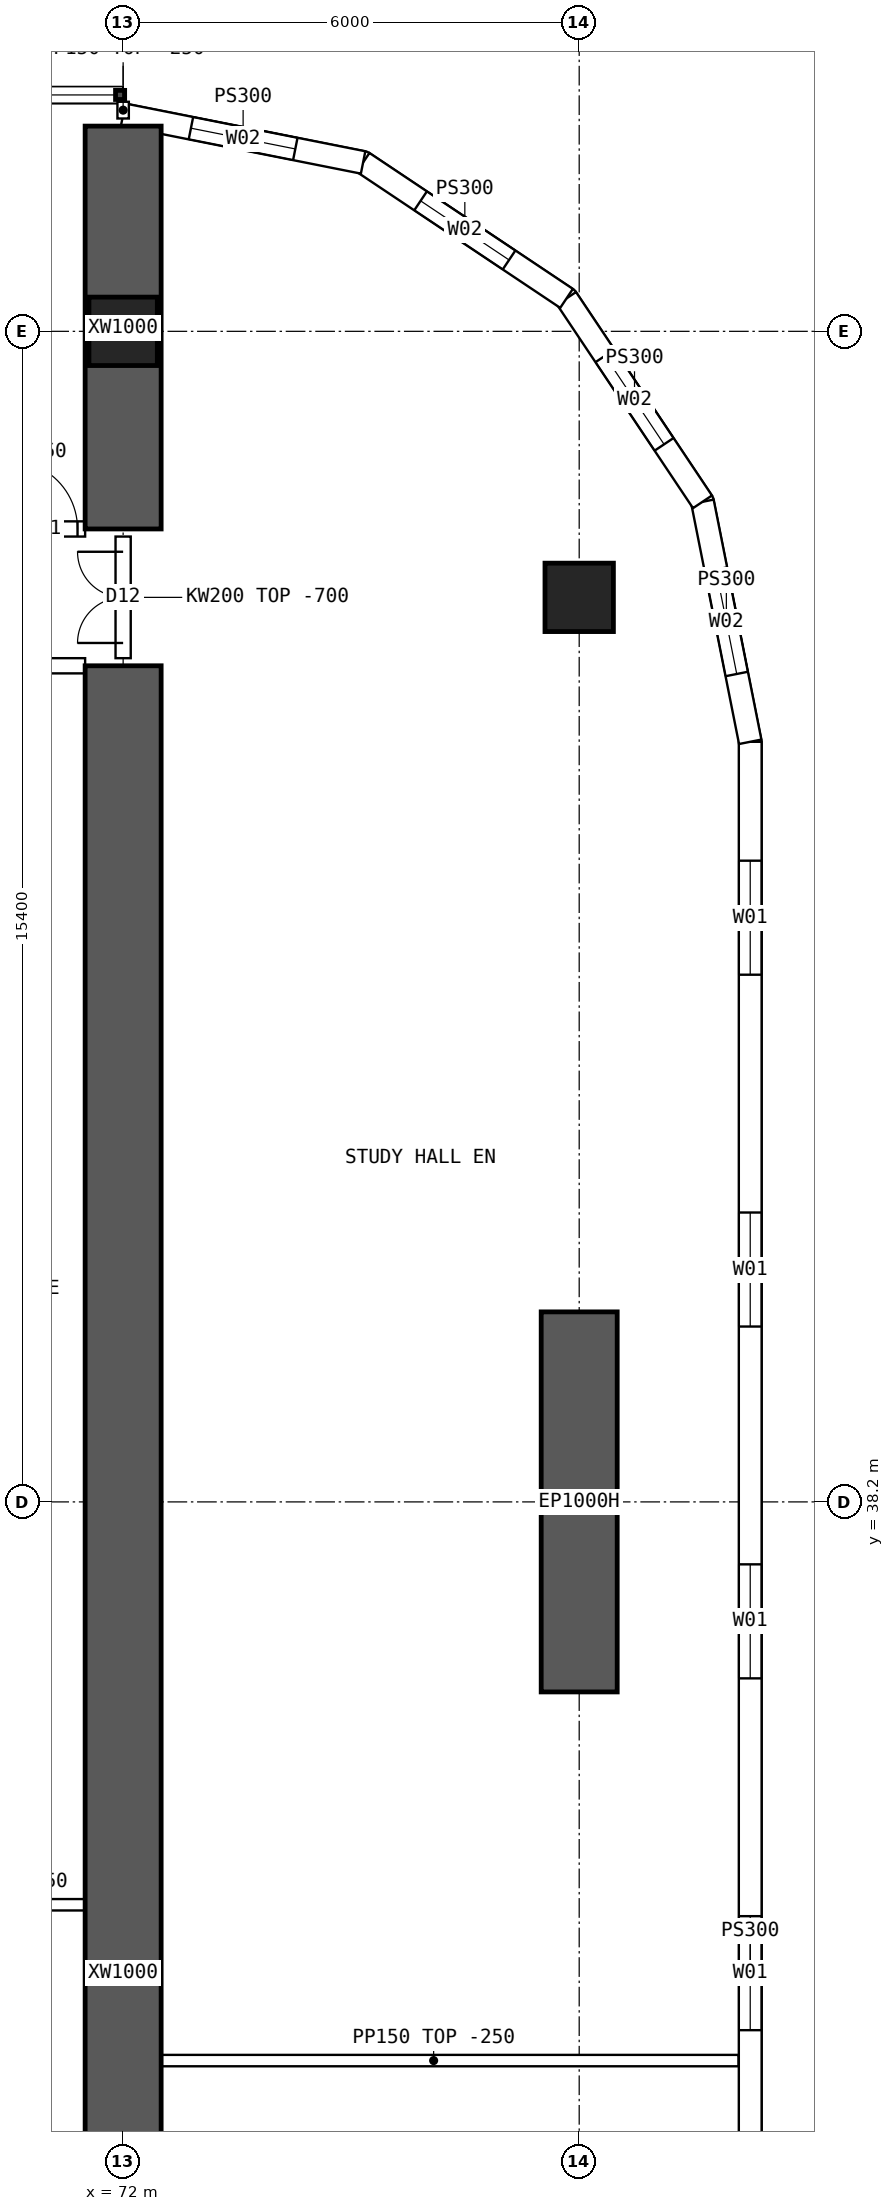
"""IFC4 building model, lengths in metres.
Left out: names, types, materials, properties, quantities, classifications, styles, units other than length and angle.
Written with IfcOpenShell. Run it as: python <this file> out.ifc"""

import sys

from ifc_helpers import new_model, si_unit, direction, frame, frame_2d, origin, origin_2d, place, context, subcontext, project, spatial, polyline, rectangle, hollow_rectangle, outline, extrude, element, fill, save


model = new_model("IFC4")
c1 = context("Model", 3, precision=1e-05, world=origin(), true_north=direction((0.0, 1.0)))
c2 = subcontext(c1, "Body", "Model", "MODEL_VIEW")
j1 = project(units=[si_unit("LENGTHUNIT", "METRE"), si_unit("PLANEANGLEUNIT", "RADIAN")], contexts=[c1])
p1 = place(None, origin())
s1 = spatial("IfcSite", under=j1, at=p1, CompositionType="ELEMENT")
p2 = place(p1, origin())
s2 = spatial("IfcBuilding", under=s1, at=p2, CompositionType="ELEMENT")
p3 = place(p2, frame((0.0, 0.0, 38.95)))
s3 = spatial("IfcBuildingStorey", under=s2, at=p3, CompositionType="ELEMENT", Elevation=38.95)
for number, where, z_axis, x_axis in (
    (1, (72.0, 53.6, 0.0), (0.0, 0.0, 1.0), (1.0, 0.0, 0.0)),
    (2, (78.0, 50.1, 0.0), (0.0, 0.0, 1.0), (1.0, 0.0, 0.0)),
):
    element("IfcColumn", number, at=place(p3, frame(where, z_axis=z_axis, x_axis=x_axis)), inside=s3, PredefinedType="COLUMN", context=c2, shape_type="SweptSolid", body=[
        extrude(hollow_rectangle(XDim=0.9, YDim=0.9, WallThickness=0.09, at=origin_2d()), origin(), (0.0, 0.0, 1.0), 3.75),
    ])
p4 = place(p3, frame((78.0, 35.7, 0.0), z_axis=(0.0, 0.0, 1.0), x_axis=(0.0, 1.0, 0.0)))
e3 = element("IfcWall", 3, at=p4, inside=s3, PredefinedType="SHEAR", context=c2, shape_type="SweptSolid", body=[
    extrude(rectangle(XDim=5.0, YDim=1.0, at=frame_2d((2.5, 0.0))), origin(), (0.0, 0.0, 1.0), 3.75),
])
p5 = place(p3, frame((72.0, 51.0, 0.0), z_axis=(0.0, 0.0, 1.0), x_axis=(0.0, 1.0, 0.0)))
e4 = element("IfcWall", 4, at=p5, inside=s3, PredefinedType="SHEAR", context=c2, shape_type="SweptSolid", body=[
    extrude(rectangle(XDim=5.3, YDim=1.0, at=frame_2d((2.65, 0.0))), origin(), (0.0, 0.0, 1.0), 3.75),
])
p6 = place(p3, frame((72.0, 14.8, 0.0), z_axis=(0.0, 0.0, 1.0), x_axis=(0.0, 1.0, 0.0)))
e5 = element("IfcWall", 5, at=p6, inside=s3, PredefinedType="SHEAR", context=c2, shape_type="SweptSolid", body=[
    extrude(rectangle(XDim=34.4, YDim=1.0, at=frame_2d((17.2, 0.0))), origin(), (0.0, 0.0, 1.0), 3.75),
])
p7 = place(p3, frame((80.25, 15.8, 0.0), z_axis=(0.0, 0.0, 1.0), x_axis=(0.0, 1.0, 0.0)))
e6 = element("IfcWall", 6, at=p7, inside=s3, PredefinedType="SOLIDWALL", context=c2, shape_type="SweptSolid", body=[
    extrude(outline(polyline([(-0.015, -0.15), (32.415, -0.15), (32.385, 0.15), (0.015, 0.15), (-0.015, -0.15)])), origin(), (0.0, 0.0, 1.0), 3.5),
])
p8 = place(p7, frame((1.564, 0.0, 0.9)))
e7 = element("IfcOpeningElement", 7, at=p8, cuts=e6, PredefinedType="OPENING", context=c2, shape_type="SweptSolid", body=[
    extrude(rectangle(XDim=1.5, YDim=2.0, at=frame_2d((0.75, 1.0))), frame((0.0, 0.16, 0.0), z_axis=(0.0, -1.0, 0.0), x_axis=(1.0, 0.0, 0.0)), (0.0, 0.0, 1.0), 0.32),
])
p9 = place(p7, frame((6.193, 0.0, 0.9)))
e8 = element("IfcOpeningElement", 8, at=p9, cuts=e6, PredefinedType="OPENING", context=c2, shape_type="SweptSolid", body=[
    extrude(rectangle(XDim=1.5, YDim=2.0, at=frame_2d((0.75, 1.0))), frame((0.0, 0.16, 0.0), z_axis=(0.0, -1.0, 0.0), x_axis=(1.0, 0.0, 0.0)), (0.0, 0.0, 1.0), 0.32),
])
p10 = place(p7, frame((10.822, 0.0, 0.9)))
e9 = element("IfcOpeningElement", 9, at=p10, cuts=e6, PredefinedType="OPENING", context=c2, shape_type="SweptSolid", body=[
    extrude(rectangle(XDim=1.5, YDim=2.0, at=frame_2d((0.75, 1.0))), frame((0.0, 0.16, 0.0), z_axis=(0.0, -1.0, 0.0), x_axis=(1.0, 0.0, 0.0)), (0.0, 0.0, 1.0), 0.32),
])
p11 = place(p7, frame((15.45, 0.0, 0.9)))
e10 = element("IfcOpeningElement", 10, at=p11, cuts=e6, PredefinedType="OPENING", context=c2, shape_type="SweptSolid", body=[
    extrude(rectangle(XDim=1.5, YDim=2.0, at=frame_2d((0.75, 1.0))), frame((0.0, 0.16, 0.0), z_axis=(0.0, -1.0, 0.0), x_axis=(1.0, 0.0, 0.0)), (0.0, 0.0, 1.0), 0.32),
])
p12 = place(p7, frame((20.079, 0.0, 0.9)))
e11 = element("IfcOpeningElement", 11, at=p12, cuts=e6, PredefinedType="OPENING", context=c2, shape_type="SweptSolid", body=[
    extrude(rectangle(XDim=1.5, YDim=2.0, at=frame_2d((0.75, 1.0))), frame((0.0, 0.16, 0.0), z_axis=(0.0, -1.0, 0.0), x_axis=(1.0, 0.0, 0.0)), (0.0, 0.0, 1.0), 0.32),
])
p13 = place(p7, frame((24.707, 0.0, 0.9)))
e12 = element("IfcOpeningElement", 12, at=p13, cuts=e6, PredefinedType="OPENING", context=c2, shape_type="SweptSolid", body=[
    extrude(rectangle(XDim=1.5, YDim=2.0, at=frame_2d((0.75, 1.0))), frame((0.0, 0.16, 0.0), z_axis=(0.0, -1.0, 0.0), x_axis=(1.0, 0.0, 0.0)), (0.0, 0.0, 1.0), 0.32),
])
p14 = place(p7, frame((29.336, 0.0, 0.9)))
e13 = element("IfcOpeningElement", 13, at=p14, cuts=e6, PredefinedType="OPENING", context=c2, shape_type="SweptSolid", body=[
    extrude(rectangle(XDim=1.5, YDim=2.0, at=frame_2d((0.75, 1.0))), frame((0.0, 0.16, 0.0), z_axis=(0.0, -1.0, 0.0), x_axis=(1.0, 0.0, 0.0)), (0.0, 0.0, 1.0), 0.32),
])
p15 = place(p3, frame((80.25, 48.2, 0.0), z_axis=(0.0, 0.0, 1.0), x_axis=(-0.195065901187, 0.980790137692, 0.0)))
e14 = element("IfcWall", 14, at=p15, inside=s3, PredefinedType="SOLIDWALL", context=c2, shape_type="SweptSolid", body=[
    extrude(outline(polyline([(-0.015, -0.15), (3.249, -0.15), (3.189, 0.15), (0.015, 0.15), (-0.015, -0.15)])), origin(), (0.0, 0.0, 1.0), 3.5),
])
p16 = place(p15, frame((0.909, 0.0, 0.9)))
e15 = element("IfcOpeningElement", 15, at=p16, cuts=e14, PredefinedType="OPENING", context=c2, shape_type="SweptSolid", body=[
    extrude(rectangle(XDim=1.4, YDim=1.8, at=frame_2d((0.7, 0.9))), frame((0.0, 0.16, 0.0), z_axis=(0.0, -1.0, 0.0), x_axis=(1.0, 0.0, 0.0)), (0.0, 0.0, 1.0), 0.32),
])
p17 = place(p3, frame((79.622, 51.357, 0.0), z_axis=(0.0, 0.0, 1.0), x_axis=(-0.555609954424, 0.831443069936, 0.0)))
e16 = element("IfcWall", 16, at=p17, inside=s3, PredefinedType="SOLIDWALL", context=c2, shape_type="SweptSolid", body=[
    extrude(outline(polyline([(-0.03, -0.15), (3.249, -0.15), (3.189, 0.15), (0.03, 0.15), (-0.03, -0.15)])), origin(), (0.0, 0.0, 1.0), 3.5),
])
p18 = place(p17, frame((0.909, 0.0, 0.9)))
e17 = element("IfcOpeningElement", 17, at=p18, cuts=e16, PredefinedType="OPENING", context=c2, shape_type="SweptSolid", body=[
    extrude(rectangle(XDim=1.4, YDim=1.8, at=frame_2d((0.7, 0.9))), frame((0.0, 0.16, 0.0), z_axis=(0.0, -1.0, 0.0), x_axis=(1.0, 0.0, 0.0)), (0.0, 0.0, 1.0), 0.32),
])
p19 = place(p3, frame((77.833, 54.034, 0.0), z_axis=(0.0, 0.0, 1.0), x_axis=(-0.831478105043, 0.555557522525, 0.0)))
e18 = element("IfcWall", 18, at=p19, inside=s3, PredefinedType="SOLIDWALL", context=c2, shape_type="SweptSolid", body=[
    extrude(outline(polyline([(-0.03, -0.15), (3.249, -0.15), (3.189, 0.15), (0.03, 0.15), (-0.03, -0.15)])), origin(), (0.0, 0.0, 1.0), 3.5),
])
p20 = place(p19, frame((0.909, 0.0, 0.9)))
e19 = element("IfcOpeningElement", 19, at=p20, cuts=e18, PredefinedType="OPENING", context=c2, shape_type="SweptSolid", body=[
    extrude(rectangle(XDim=1.4, YDim=1.8, at=frame_2d((0.7, 0.9))), frame((0.0, 0.16, 0.0), z_axis=(0.0, -1.0, 0.0), x_axis=(1.0, 0.0, 0.0)), (0.0, 0.0, 1.0), 0.32),
])
p21 = place(p3, frame((75.157, 55.822, 0.0), z_axis=(0.0, 0.0, 1.0), x_axis=(-0.980787251524, 0.195080412259, 0.0)))
e20 = element("IfcWall", 20, at=p21, inside=s3, PredefinedType="SOLIDWALL", context=c2, shape_type="SweptSolid", body=[
    extrude(outline(polyline([(-0.03, -0.15), (3.249, -0.15), (3.189, 0.15), (0.03, 0.15), (-0.03, -0.15)])), origin(), (0.0, 0.0, 1.0), 3.5),
])
p22 = place(p21, frame((0.909, 0.0, 0.9)))
e21 = element("IfcOpeningElement", 21, at=p22, cuts=e20, PredefinedType="OPENING", context=c2, shape_type="SweptSolid", body=[
    extrude(rectangle(XDim=1.4, YDim=1.8, at=frame_2d((0.7, 0.9))), frame((0.0, 0.16, 0.0), z_axis=(0.0, -1.0, 0.0), x_axis=(1.0, 0.0, 0.0)), (0.0, 0.0, 1.0), 0.32),
])
p23 = place(p3, frame((66.5, 51.0, 0.0), z_axis=(0.0, 0.0, 1.0), x_axis=(1.0, 0.0, 0.0)))
e22 = element("IfcWall", 22, at=p23, inside=s3, PredefinedType="SOLIDWALL", context=c2, shape_type="SweptSolid", body=[
    extrude(outline(polyline([(0.0, 0.0), (5.0, 0.0), (5.0, 3.1), (0.0, 3.1), (0.0, 0.0)])), frame((0.0, 0.1, 0.0), z_axis=(0.0, -1.0, 0.0), x_axis=(1.0, 0.0, 0.0)), (0.0, 0.0, 1.0), 0.2),
])
p24 = place(p23, frame((0.1, 0.0, 0.0)))
e23 = element("IfcOpeningElement", 23, at=p24, cuts=e22, PredefinedType="OPENING", context=c2, shape_type="SweptSolid", body=[
    extrude(rectangle(XDim=0.9, YDim=2.1, at=frame_2d((0.45, 1.05))), frame((0.0, 0.11, 0.0), z_axis=(0.0, -1.0, 0.0), x_axis=(1.0, 0.0, 0.0)), (0.0, 0.0, 1.0), 0.22),
])
p25 = place(p23, frame((4.0, 0.0, 0.0)))
e24 = element("IfcOpeningElement", 24, at=p25, cuts=e22, PredefinedType="OPENING", context=c2, shape_type="SweptSolid", body=[
    extrude(rectangle(XDim=0.9, YDim=2.1, at=frame_2d((0.45, 1.05))), frame((0.0, 0.11, 0.0), z_axis=(0.0, -1.0, 0.0), x_axis=(1.0, 0.0, 0.0)), (0.0, 0.0, 1.0), 0.22),
])
p26 = place(p3, frame((66.5, 49.2, 0.0), z_axis=(0.0, 0.0, 1.0), x_axis=(1.0, 0.0, 0.0)))
e25 = element("IfcWall", 25, at=p26, inside=s3, PredefinedType="SOLIDWALL", context=c2, shape_type="SweptSolid", body=[
    extrude(rectangle(XDim=5.0, YDim=0.2, at=frame_2d((2.5, 0.0))), origin(), (0.0, 0.0, 1.0), 3.5),
])
p27 = place(p26, frame((0.2, 0.0, 0.0)))
e26 = element("IfcOpeningElement", 26, at=p27, cuts=e25, PredefinedType="OPENING", context=c2, shape_type="SweptSolid", body=[
    extrude(rectangle(XDim=1.6, YDim=2.1, at=frame_2d((0.8, 1.05))), frame((0.0, 0.11, 0.0), z_axis=(0.0, -1.0, 0.0), x_axis=(1.0, 0.0, 0.0)), (0.0, 0.0, 1.0), 0.22),
])
p28 = place(p3, frame((68.4, 32.9, 0.0), z_axis=(0.0, 0.0, 1.0), x_axis=(1.0, 0.0, 0.0)))
e27 = element("IfcWall", 27, at=p28, inside=s3, PredefinedType="PARTITIONING", context=c2, shape_type="SweptSolid", body=[
    extrude(rectangle(XDim=3.6, YDim=0.15, at=frame_2d((1.8, 0.0))), origin(), (0.0, 0.0, 1.0), 3.5),
])
p29 = place(p3, frame((72.075, 30.85, 0.0), z_axis=(0.0, 0.0, 1.0), x_axis=(1.0, 0.0, 0.0)))
e28 = element("IfcWall", 28, at=p29, inside=s3, PredefinedType="PARTITIONING", context=c2, shape_type="SweptSolid", body=[
    extrude(outline(polyline([(0.0, 0.0), (8.02, 0.0), (8.02, 3.5), (6.227, 3.5), (6.225, 3.05), (5.627, 3.05), (5.625, 3.5), (0.0, 3.5), (0.0, 0.0)])), frame((0.0, 0.075, 0.0), z_axis=(0.0, -1.0, 0.0), x_axis=(1.0, 0.0, 0.0)), (0.0, 0.0, 1.0), 0.15),
])
p30 = place(p3, frame((72.0, 49.3, 0.0), z_axis=(0.0, 0.0, 1.0), x_axis=(0.0, 1.0, 0.0)))
e29 = element("IfcWall", 29, at=p30, inside=s3, PredefinedType="SOLIDWALL", context=c2, shape_type="SweptSolid", body=[
    extrude(outline(polyline([(0.0, 0.0), (1.6, 0.0), (1.6, 3.05), (0.0, 3.05), (0.0, 0.0)])), frame((0.0, 0.1, 0.0), z_axis=(0.0, -1.0, 0.0), x_axis=(1.0, 0.0, 0.0)), (0.0, 0.0, 1.0), 0.2),
])
p31 = place(p30, frame((0.2, 0.0, 0.0)))
e30 = element("IfcOpeningElement", 30, at=p31, cuts=e29, PredefinedType="OPENING", context=c2, shape_type="SweptSolid", body=[
    extrude(rectangle(XDim=1.2, YDim=2.1, at=frame_2d((0.6, 1.05))), frame((0.0, 0.11, 0.0), z_axis=(0.0, -1.0, 0.0), x_axis=(1.0, 0.0, 0.0)), (0.0, 0.0, 1.0), 0.22),
])
p32 = place(p3, frame((72.0, 56.4, 0.0), z_axis=(0.0, 0.0, 1.0), x_axis=(0.0, 1.0, 0.0)))
e31 = element("IfcWall", 31, at=p32, inside=s3, PredefinedType="PARTITIONING", context=c2, shape_type="SweptSolid", body=[
    extrude(rectangle(XDim=0.22, YDim=0.15, at=frame_2d((0.11, 0.0))), origin(), (0.0, 0.0, 1.0), 3.5),
])
p33 = place(p11, origin())
e32 = element("IfcWindow", 32, at=p33, inside=s3, PartitioningType="SINGLE_PANEL", PredefinedType="WINDOW", context=c2, shape_type="SweptSolid", body=[
    extrude(rectangle(XDim=1.5, YDim=2.0, at=frame_2d((0.75, 1.0))), frame((0.0, 0.03, 0.0), z_axis=(0.0, -1.0, 0.0), x_axis=(1.0, 0.0, 0.0)), (0.0, 0.0, 1.0), 0.06),
])
fill(e10, e32)
p34 = place(p12, origin())
e33 = element("IfcWindow", 33, at=p34, inside=s3, PartitioningType="SINGLE_PANEL", PredefinedType="WINDOW", context=c2, shape_type="SweptSolid", body=[
    extrude(rectangle(XDim=1.5, YDim=2.0, at=frame_2d((0.75, 1.0))), frame((0.0, 0.03, 0.0), z_axis=(0.0, -1.0, 0.0), x_axis=(1.0, 0.0, 0.0)), (0.0, 0.0, 1.0), 0.06),
])
fill(e11, e33)
p35 = place(p13, origin())
e34 = element("IfcWindow", 34, at=p35, inside=s3, PartitioningType="SINGLE_PANEL", PredefinedType="WINDOW", context=c2, shape_type="SweptSolid", body=[
    extrude(rectangle(XDim=1.5, YDim=2.0, at=frame_2d((0.75, 1.0))), frame((0.0, 0.03, 0.0), z_axis=(0.0, -1.0, 0.0), x_axis=(1.0, 0.0, 0.0)), (0.0, 0.0, 1.0), 0.06),
])
fill(e12, e34)
p36 = place(p14, origin())
e35 = element("IfcWindow", 35, at=p36, inside=s3, PartitioningType="SINGLE_PANEL", PredefinedType="WINDOW", context=c2, shape_type="SweptSolid", body=[
    extrude(rectangle(XDim=1.5, YDim=2.0, at=frame_2d((0.75, 1.0))), frame((0.0, 0.03, 0.0), z_axis=(0.0, -1.0, 0.0), x_axis=(1.0, 0.0, 0.0)), (0.0, 0.0, 1.0), 0.06),
])
fill(e13, e35)
p37 = place(p16, origin())
e36 = element("IfcWindow", 36, at=p37, inside=s3, PartitioningType="SINGLE_PANEL", PredefinedType="WINDOW", context=c2, shape_type="SweptSolid", body=[
    extrude(rectangle(XDim=1.4, YDim=1.8, at=frame_2d((0.7, 0.9))), frame((0.0, 0.03, 0.0), z_axis=(0.0, -1.0, 0.0), x_axis=(1.0, 0.0, 0.0)), (0.0, 0.0, 1.0), 0.06),
])
fill(e15, e36)
p38 = place(p18, origin())
e37 = element("IfcWindow", 37, at=p38, inside=s3, PartitioningType="SINGLE_PANEL", PredefinedType="WINDOW", context=c2, shape_type="SweptSolid", body=[
    extrude(rectangle(XDim=1.4, YDim=1.8, at=frame_2d((0.7, 0.9))), frame((0.0, 0.03, 0.0), z_axis=(0.0, -1.0, 0.0), x_axis=(1.0, 0.0, 0.0)), (0.0, 0.0, 1.0), 0.06),
])
fill(e17, e37)
p39 = place(p20, origin())
e38 = element("IfcWindow", 38, at=p39, inside=s3, PartitioningType="SINGLE_PANEL", PredefinedType="WINDOW", context=c2, shape_type="SweptSolid", body=[
    extrude(rectangle(XDim=1.4, YDim=1.8, at=frame_2d((0.7, 0.9))), frame((0.0, 0.03, 0.0), z_axis=(0.0, -1.0, 0.0), x_axis=(1.0, 0.0, 0.0)), (0.0, 0.0, 1.0), 0.06),
])
fill(e19, e38)
p40 = place(p22, origin())
e39 = element("IfcWindow", 39, at=p40, inside=s3, PartitioningType="SINGLE_PANEL", PredefinedType="WINDOW", context=c2, shape_type="SweptSolid", body=[
    extrude(rectangle(XDim=1.4, YDim=1.8, at=frame_2d((0.7, 0.9))), frame((0.0, 0.03, 0.0), z_axis=(0.0, -1.0, 0.0), x_axis=(1.0, 0.0, 0.0)), (0.0, 0.0, 1.0), 0.06),
])
fill(e21, e39)
p41 = place(p25, origin())
e40 = element("IfcDoor", 40, at=p41, inside=s3, OperationType="SINGLE_SWING_LEFT", PredefinedType="DOOR", context=c2, shape_type="SweptSolid", body=[
    extrude(rectangle(XDim=0.9, YDim=2.1, at=frame_2d((0.45, 1.05))), frame((0.0, 0.025, 0.0), z_axis=(0.0, -1.0, 0.0), x_axis=(1.0, 0.0, 0.0)), (0.0, 0.0, 1.0), 0.05),
])
fill(e24, e40)
p42 = place(p31, origin())
e41 = element("IfcDoor", 41, at=p42, inside=s3, OperationType="DOUBLE_DOOR_SINGLE_SWING", PredefinedType="DOOR", context=c2, shape_type="SweptSolid", body=[
    extrude(rectangle(XDim=1.2, YDim=2.1, at=frame_2d((0.6, 1.05))), frame((0.0, 0.025, 0.0), z_axis=(0.0, -1.0, 0.0), x_axis=(1.0, 0.0, 0.0)), (0.0, 0.0, 1.0), 0.05),
])
fill(e30, e41)
save(model, sys.argv[1])
